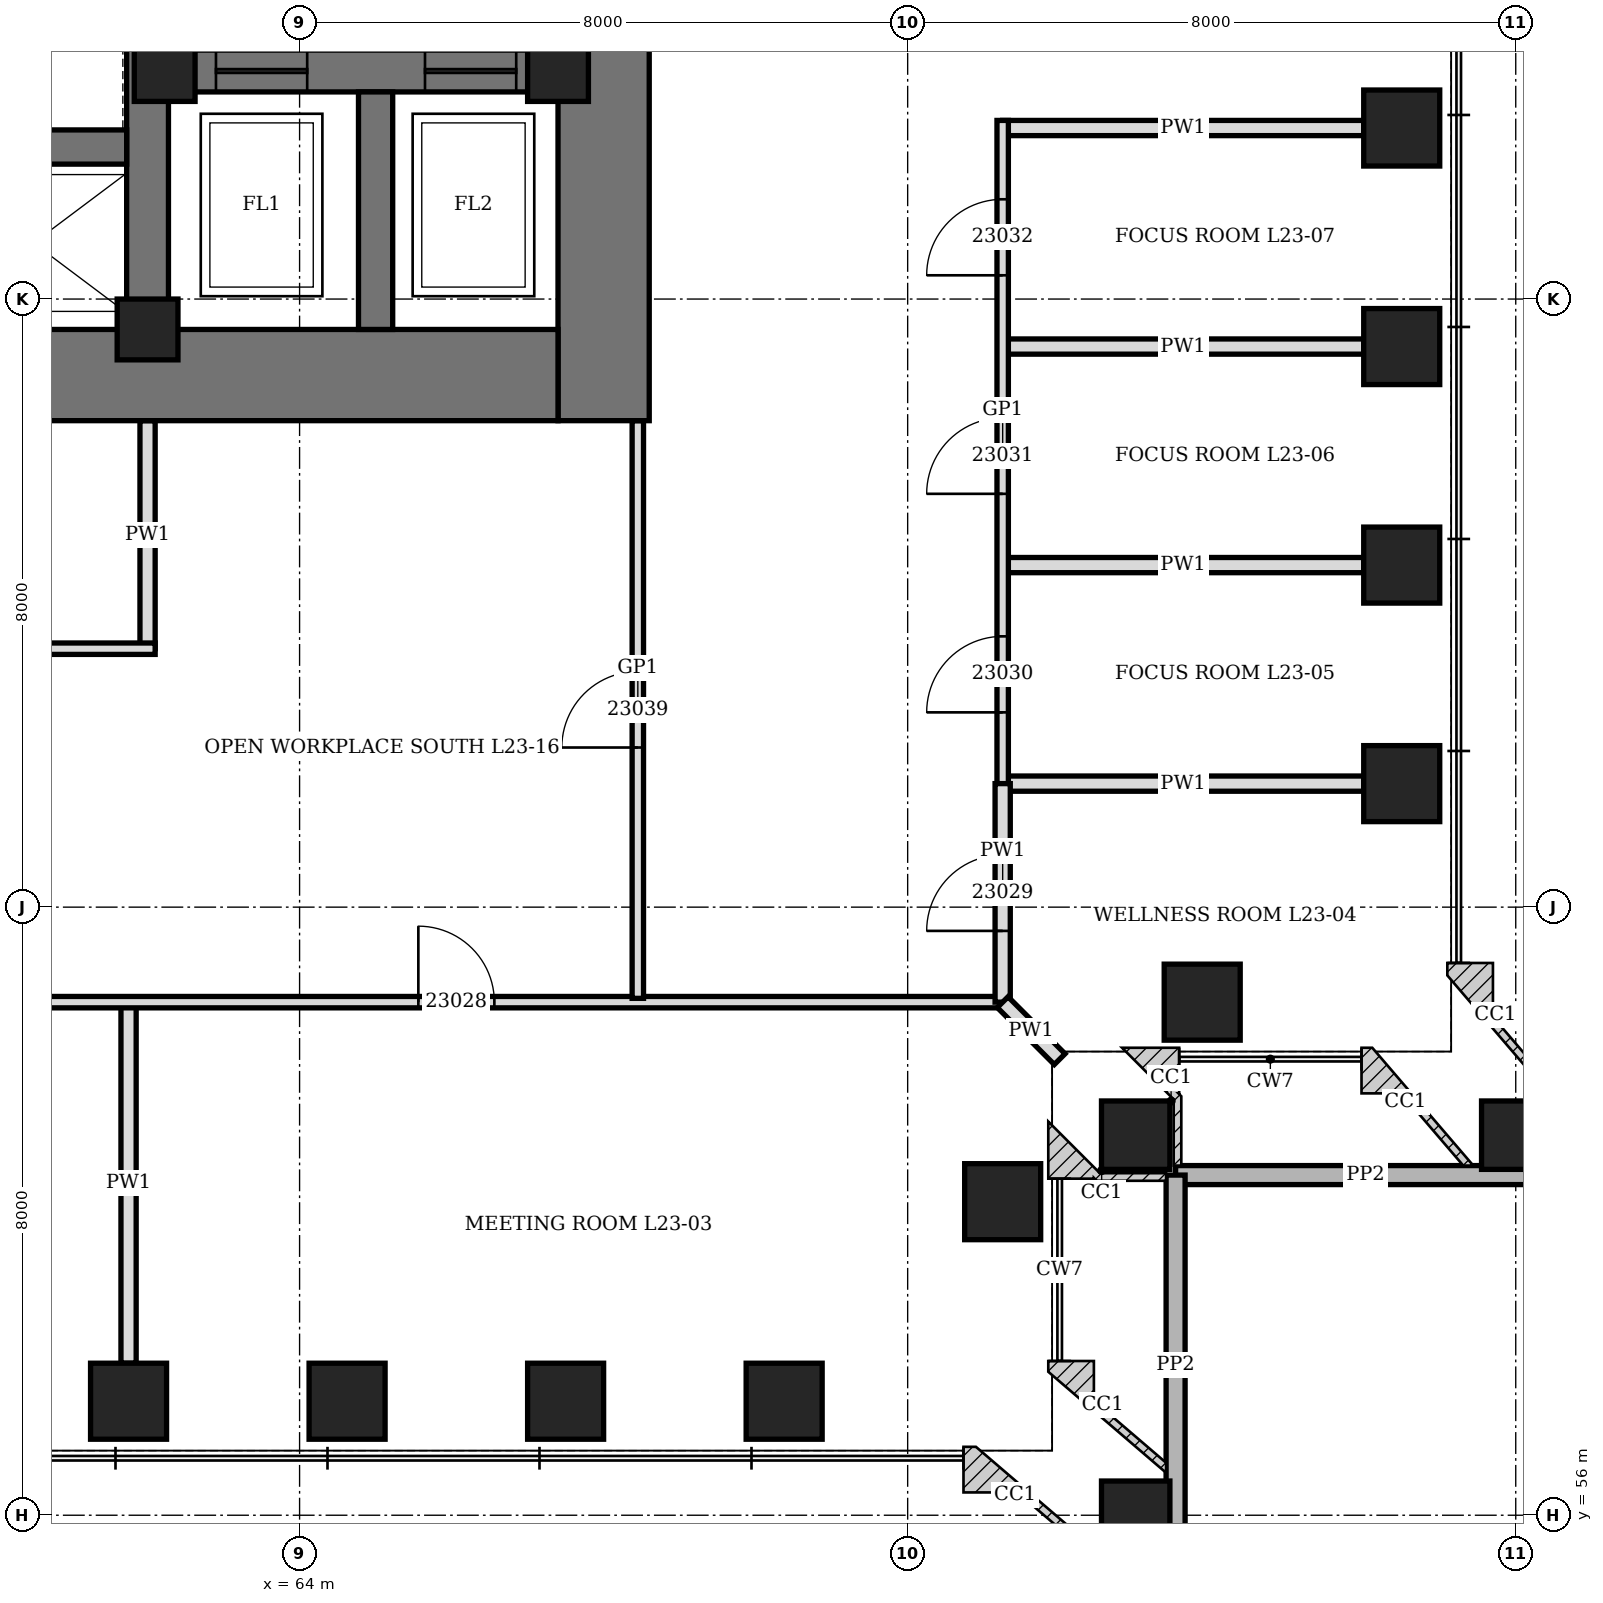
"""IFC4 building model, lengths in metres.
Left out: names, types, materials, properties, quantities, classifications, styles, units other than length and angle.
Written with IfcOpenShell. Run it as: python <this file> out.ifc"""

import sys

from ifc_helpers import new_model, si_unit, direction, frame, frame_2d, origin, origin_2d, place, context, subcontext, project, spatial, rectangle, hollow_rectangle, extrude, clip, halfspace, element, fill, save


model = new_model("IFC4")
c1 = context("Model", 3, precision=1e-05, world=origin(), true_north=direction((0.0, 1.0)))
c2 = subcontext(c1, "Body", "Model", "MODEL_VIEW")
j1 = project(units=[si_unit("LENGTHUNIT", "METRE"), si_unit("PLANEANGLEUNIT", "RADIAN")], contexts=[c1])
p1 = place(None, origin())
s1 = spatial("IfcSite", under=j1, at=p1, CompositionType="ELEMENT")
p2 = place(p1, origin())
s2 = spatial("IfcBuilding", under=s1, at=p2, CompositionType="ELEMENT")
p3 = place(p2, frame((0.0, 0.0, 108.1)))
s3 = spatial("IfcBuildingStorey", under=s2, at=p3, CompositionType="ELEMENT", Elevation=108.1)
for number, where, z_axis, x_axis in (
    (1, (61.75, 57.5, -0.25), (0.0, 0.0, 1.0), (1.0, 0.0, 0.0)),
    (2, (64.625, 57.5, -0.25), (0.0, 0.0, 1.0), (1.0, 0.0, 0.0)),
    (3, (67.5, 57.5, -0.25), (0.0, 0.0, 1.0), (1.0, 0.0, 0.0)),
    (4, (70.375, 57.5, -0.25), (0.0, 0.0, 1.0), (1.0, 0.0, 0.0)),
):
    element("IfcColumn", number, at=place(p3, frame(where, z_axis=z_axis, x_axis=x_axis)), inside=s3, PredefinedType="COLUMN", context=c2, shape_type="SweptSolid", body=[
        extrude(hollow_rectangle(XDim=1.0, YDim=1.0, WallThickness=0.35, at=origin_2d()), origin(), (0.0, 0.0, 1.0), 4.45),
    ])
p4 = place(p3, frame((75.0, 56.0, -0.25), z_axis=(-0.349200787792, 0.299314960964, 0.887957974202), x_axis=(-0.650791373456, -0.759256602365, 0.0)))
e5 = element("IfcColumn", 5, at=p4, inside=s3, PredefinedType="COLUMN", context=c2, shape_type="Clipping", body=[
    clip(clip(extrude(hollow_rectangle(XDim=0.9, YDim=0.9, WallThickness=0.2, at=origin_2d()), origin(), (0.0, 0.0, 1.0), 5.011), halfspace(frame((0.0, 0.0, 0.235), z_axis=(0.0, 0.0, 1.0), x_axis=(1.0, 0.0, 0.0)), True)), halfspace(frame((0.0, 0.0, 4.776), z_axis=(0.0, 0.0, -1.0), x_axis=(1.0, 0.0, 0.0)), True)),
])
p5 = place(p3, frame((73.25, 60.125, -0.25), z_axis=(0.0, 0.0, 1.0), x_axis=(0.0, 1.0, 0.0)))
e6 = element("IfcColumn", 6, at=p5, inside=s3, PredefinedType="COLUMN", context=c2, shape_type="SweptSolid", body=[
    extrude(hollow_rectangle(XDim=1.0, YDim=1.0, WallThickness=0.35, at=origin_2d()), origin(), (0.0, 0.0, 1.0), 4.45),
])
p6 = place(p3, frame((75.0, 61.0, -0.25), z_axis=(-0.343685624304, 0.343685624304, 0.873933855216), x_axis=(-0.707106781187, -0.707106781187, 0.0)))
e7 = element("IfcColumn", 7, at=p6, inside=s3, PredefinedType="COLUMN", context=c2, shape_type="Clipping", body=[
    clip(clip(extrude(hollow_rectangle(XDim=0.9, YDim=0.9, WallThickness=0.2, at=origin_2d()), origin(), (0.0, 0.0, 1.0), 5.092), halfspace(frame((0.0, 0.0, 0.253), z_axis=(0.0, 0.0, 1.0), x_axis=(1.0, 0.0, 0.0)), True)), halfspace(frame((0.0, 0.0, 4.839), z_axis=(0.0, 0.0, -1.0), x_axis=(1.0, 0.0, 0.0)), True)),
])
p7 = place(p3, frame((75.875, 62.75, -0.25), z_axis=(0.0, 0.0, 1.0), x_axis=(1.0, 0.0, 0.0)))
e8 = element("IfcColumn", 8, at=p7, inside=s3, PredefinedType="COLUMN", context=c2, shape_type="SweptSolid", body=[
    extrude(hollow_rectangle(XDim=1.0, YDim=1.0, WallThickness=0.35, at=origin_2d()), origin(), (0.0, 0.0, 1.0), 4.45),
])
p8 = place(p3, frame((80.0, 61.0, -0.25), z_axis=(-0.299314960964, 0.349200787792, 0.887957974202), x_axis=(-0.759256602365, -0.650791373456, 0.0)))
e9 = element("IfcColumn", 9, at=p8, inside=s3, PredefinedType="COLUMN", context=c2, shape_type="Clipping", body=[
    clip(clip(extrude(hollow_rectangle(XDim=0.9, YDim=0.9, WallThickness=0.2, at=origin_2d()), origin(), (0.0, 0.0, 1.0), 5.011), halfspace(frame((0.0, 0.0, 0.235), z_axis=(0.0, 0.0, 1.0), x_axis=(1.0, 0.0, 0.0)), True)), halfspace(frame((0.0, 0.0, 4.776), z_axis=(0.0, 0.0, -1.0), x_axis=(1.0, 0.0, 0.0)), True)),
])
for number, where, z_axis, x_axis in (
    (10, (78.5, 65.625, -0.25), (0.0, 0.0, 1.0), (0.0, 1.0, 0.0)),
    (11, (78.5, 68.5, -0.25), (0.0, 0.0, 1.0), (0.0, 1.0, 0.0)),
    (12, (78.5, 71.375, -0.25), (0.0, 0.0, 1.0), (0.0, 1.0, 0.0)),
    (13, (78.5, 74.25, -0.25), (0.0, 0.0, 1.0), (0.0, 1.0, 0.0)),
):
    element("IfcColumn", number, at=place(p3, frame(where, z_axis=z_axis, x_axis=x_axis)), inside=s3, PredefinedType="COLUMN", context=c2, shape_type="SweptSolid", body=[
        extrude(hollow_rectangle(XDim=1.0, YDim=1.0, WallThickness=0.35, at=origin_2d()), origin(), (0.0, 0.0, 1.0), 4.45),
    ])
p9 = place(p3, frame((68.0, 70.4, 0.0), z_axis=(0.0, 0.0, 1.0), x_axis=(0.0, 1.0, 0.0)))
e14 = element("IfcWall", 14, at=p9, inside=s3, PredefinedType="SHEAR", context=c2, shape_type="SweptSolid", body=[
    extrude(rectangle(XDim=19.2, YDim=1.2, at=frame_2d((9.6, 0.0))), origin(), (0.0, 0.0, 1.0), 4.2),
])
p10 = place(p9, frame((8.6, 0.0, 0.0)))
e15 = element("IfcOpeningElement", 15, at=p10, cuts=e14, PredefinedType="OPENING", context=c2, shape_type="SweptSolid", body=[
    extrude(rectangle(XDim=2.0, YDim=2.4, at=frame_2d((1.0, 1.2))), frame((0.0, 0.61, 0.0), z_axis=(0.0, -1.0, 0.0), x_axis=(1.0, 0.0, 0.0)), (0.0, 0.0, 1.0), 1.22),
])
p11 = place(p3, frame((44.6, 71.0, 0.0), z_axis=(0.0, 0.0, 1.0), x_axis=(1.0, 0.0, 0.0)))
e16 = element("IfcWall", 16, at=p11, inside=s3, PredefinedType="SHEAR", context=c2, shape_type="SweptSolid", body=[
    extrude(rectangle(XDim=22.8, YDim=1.2, at=frame_2d((11.4, 0.0))), origin(), (0.0, 0.0, 1.0), 4.2),
])
p12 = place(p3, frame((62.0, 71.6, 0.0), z_axis=(0.0, 0.0, 1.0), x_axis=(0.0, 1.0, 0.0)))
e17 = element("IfcWall", 17, at=p12, inside=s3, PredefinedType="SHEAR", context=c2, shape_type="SweptSolid", body=[
    extrude(rectangle(XDim=16.8, YDim=0.55, at=frame_2d((8.4, 0.0))), origin(), (0.0, 0.0, 1.0), 4.2),
])
p13 = place(p12, frame((7.5, 0.0, 0.0)))
e18 = element("IfcOpeningElement", 18, at=p13, cuts=e17, PredefinedType="OPENING", context=c2, shape_type="SweptSolid", body=[
    extrude(rectangle(XDim=1.8, YDim=2.4, at=frame_2d((0.9, 1.2))), frame((0.0, 0.285, 0.0), z_axis=(0.0, -1.0, 0.0), x_axis=(1.0, 0.0, 0.0)), (0.0, 0.0, 1.0), 0.57),
])
p14 = place(p3, frame((62.275, 75.0, 0.0), z_axis=(0.0, 0.0, 1.0), x_axis=(1.0, 0.0, 0.0)))
e19 = element("IfcWall", 19, at=p14, inside=s3, PredefinedType="SHEAR", context=c2, shape_type="SweptSolid", body=[
    extrude(rectangle(XDim=5.125, YDim=0.55, at=frame_2d((2.562, 0.0))), origin(), (0.0, 0.0, 1.0), 4.2),
])
p15 = place(p14, frame((0.625, 0.0, 0.0)))
e20 = element("IfcOpeningElement", 20, at=p15, cuts=e19, PredefinedType="OPENING", context=c2, shape_type="SweptSolid", body=[
    extrude(rectangle(XDim=1.2, YDim=2.2, at=frame_2d((0.6, 1.1))), frame((0.0, 0.285, 0.0), z_axis=(0.0, -1.0, 0.0), x_axis=(1.0, 0.0, 0.0)), (0.0, 0.0, 1.0), 0.57),
])
p16 = place(p14, frame((3.375, 0.0, 0.0)))
e21 = element("IfcOpeningElement", 21, at=p16, cuts=e19, PredefinedType="OPENING", context=c2, shape_type="SweptSolid", body=[
    extrude(rectangle(XDim=1.2, YDim=2.2, at=frame_2d((0.6, 1.1))), frame((0.0, 0.285, 0.0), z_axis=(0.0, -1.0, 0.0), x_axis=(1.0, 0.0, 0.0)), (0.0, 0.0, 1.0), 0.57),
])
p17 = place(p3, frame((50.275, 74.0, 0.0), z_axis=(0.0, 0.0, 1.0), x_axis=(1.0, 0.0, 0.0)))
e22 = element("IfcWall", 22, at=p17, inside=s3, PredefinedType="SHEAR", context=c2, shape_type="SweptSolid", body=[
    extrude(rectangle(XDim=11.45, YDim=0.45, at=frame_2d((5.725, 0.0))), origin(), (0.0, 0.0, 1.0), 4.2),
])
p18 = place(p3, frame((65.0, 71.6, 0.0), z_axis=(0.0, 0.0, 1.0), x_axis=(0.0, 1.0, 0.0)))
e23 = element("IfcWall", 23, at=p18, inside=s3, PredefinedType="SHEAR", context=c2, shape_type="SweptSolid", body=[
    extrude(rectangle(XDim=3.125, YDim=0.45, at=frame_2d((1.562, 0.0))), origin(), (0.0, 0.0, 1.0), 4.2),
])
for number, where, z_axis, x_axis in (
    (24, (62.0, 71.6, 0.0), (0.0, 0.0, 1.0), (1.0, 0.0, 0.0)),
    (25, (62.225, 75.0, 0.0), (0.0, 0.0, 1.0), (1.0, 0.0, 0.0)),
    (26, (67.4, 75.0, 0.0), (0.0, 0.0, 1.0), (1.0, 0.0, 0.0)),
):
    element("IfcColumn", number, at=place(p3, frame(where, z_axis=z_axis, x_axis=x_axis)), inside=s3, PredefinedType="COLUMN", context=c2, shape_type="SweptSolid", body=[
        extrude(hollow_rectangle(XDim=0.8, YDim=0.8, WallThickness=0.1, at=origin_2d()), origin(), (0.0, 0.0, 1.0), 4.2),
    ])
for number, where, z_axis, x_axis in (
    (27, (80.525, 60.475, 0.0), (0.0, 0.0, 1.0), (-1.0, 0.0, 0.0)),
    (28, (75.525, 60.475, 0.0), (0.0, 0.0, 1.0), (0.0, -1.0, 0.0)),
):
    element("IfcWall", number, at=place(p3, frame(where, z_axis=z_axis, x_axis=x_axis)), inside=s3, PredefinedType="PARAPET", context=c2, shape_type="SweptSolid", body=[
        extrude(rectangle(XDim=5.0, YDim=0.25, at=frame_2d((2.5, 0.0))), origin(), (0.0, 0.0, 1.0), 1.1),
    ])
p19 = place(p3, frame((61.75, 58.0, 0.0), z_axis=(0.0, 0.0, 1.0), x_axis=(0.0, 1.0, 0.0)))
e29 = element("IfcWall", 29, at=p19, inside=s3, PredefinedType="PARTITIONING", context=c2, shape_type="SweptSolid", body=[
    extrude(rectangle(XDim=4.75, YDim=0.2, at=frame_2d((2.375, 0.0))), origin(), (0.0, 0.0, 1.0), 3.278),
])
for number, where, z_axis, x_axis in (
    (30, (73.25, 65.625, 0.0), (0.0, 0.0, 1.0), (1.0, 0.0, 0.0)),
    (31, (73.25, 68.5, 0.0), (0.0, 0.0, 1.0), (1.0, 0.0, 0.0)),
    (32, (73.25, 71.375, 0.0), (0.0, 0.0, 1.0), (1.0, 0.0, 0.0)),
    (33, (73.25, 74.25, 0.0), (0.0, 0.0, 1.0), (1.0, 0.0, 0.0)),
):
    element("IfcWall", number, at=place(p3, frame(where, z_axis=z_axis, x_axis=x_axis)), inside=s3, PredefinedType="PARTITIONING", context=c2, shape_type="SweptSolid", body=[
        extrude(rectangle(XDim=4.75, YDim=0.2, at=frame_2d((2.375, 0.0))), origin(), (0.0, 0.0, 1.0), 3.428),
    ])
p20 = place(p3, frame((62.0, 67.4, 0.0), z_axis=(0.0, 0.0, 1.0), x_axis=(0.0, 1.0, 0.0)))
e34 = element("IfcWall", 34, at=p20, inside=s3, PredefinedType="PARTITIONING", context=c2, shape_type="SweptSolid", body=[
    extrude(rectangle(XDim=3.0, YDim=0.2, at=frame_2d((1.5, 0.0))), origin(), (0.0, 0.0, 1.0), 4.04),
])
p21 = place(p3, frame((38.75, 62.75, 0.0), z_axis=(0.0, 0.0, 1.0), x_axis=(1.0, 0.0, 0.0)))
e35 = element("IfcWall", 35, at=p21, inside=s3, PredefinedType="PARTITIONING", context=c2, shape_type="SweptSolid", body=[
    extrude(rectangle(XDim=34.5, YDim=0.15, at=frame_2d((17.25, 0.0))), origin(), (0.0, 0.0, 1.0), 4.04),
])
p22 = place(p21, frame((3.5, 0.0, 0.0)))
e36 = element("IfcOpeningElement", 36, at=p22, cuts=e35, PredefinedType="OPENING", context=c2, shape_type="SweptSolid", body=[
    extrude(rectangle(XDim=1.0, YDim=2.4, at=frame_2d((0.5, 1.2))), frame((0.0, 0.085, 0.0), z_axis=(0.0, -1.0, 0.0), x_axis=(1.0, 0.0, 0.0)), (0.0, 0.0, 1.0), 0.17),
])
p23 = place(p21, frame((15.312, 0.0, 0.0)))
e37 = element("IfcOpeningElement", 37, at=p23, cuts=e35, PredefinedType="OPENING", context=c2, shape_type="SweptSolid", body=[
    extrude(rectangle(XDim=1.0, YDim=2.4, at=frame_2d((0.5, 1.2))), frame((0.0, 0.085, 0.0), z_axis=(0.0, -1.0, 0.0), x_axis=(1.0, 0.0, 0.0)), (0.0, 0.0, 1.0), 0.17),
])
p24 = place(p21, frame((26.812, 0.0, 0.0)))
e38 = element("IfcOpeningElement", 38, at=p24, cuts=e35, PredefinedType="OPENING", context=c2, shape_type="SweptSolid", body=[
    extrude(rectangle(XDim=1.0, YDim=2.4, at=frame_2d((0.5, 1.2))), frame((0.0, 0.085, 0.0), z_axis=(0.0, -1.0, 0.0), x_axis=(1.0, 0.0, 0.0)), (0.0, 0.0, 1.0), 0.17),
])
p25 = place(p3, frame((49.9, 67.4, 0.0), z_axis=(0.0, 0.0, 1.0), x_axis=(1.0, 0.0, 0.0)))
e39 = element("IfcWall", 39, at=p25, inside=s3, PredefinedType="PARTITIONING", context=c2, shape_type="SweptSolid", body=[
    extrude(rectangle(XDim=12.2, YDim=0.15, at=frame_2d((6.1, 0.0))), origin(), (0.0, 0.0, 1.0), 4.04),
])
p26 = place(p25, frame((5.6, 0.0, 0.0)))
e40 = element("IfcOpeningElement", 40, at=p26, cuts=e39, PredefinedType="OPENING", context=c2, shape_type="SweptSolid", body=[
    extrude(rectangle(XDim=1.0, YDim=2.4, at=frame_2d((0.5, 1.2))), frame((0.0, 0.085, 0.0), z_axis=(0.0, -1.0, 0.0), x_axis=(1.0, 0.0, 0.0)), (0.0, 0.0, 1.0), 0.17),
])
p27 = place(p3, frame((68.45, 62.8, 0.0), z_axis=(0.0, 0.0, 1.0), x_axis=(0.0, 1.0, 0.0)))
e41 = element("IfcWall", 41, at=p27, inside=s3, PredefinedType="PARTITIONING", context=c2, shape_type="SweptSolid", body=[
    extrude(rectangle(XDim=7.6, YDim=0.15, at=frame_2d((3.8, 0.0))), origin(), (0.0, 0.0, 1.0), 4.04),
])
p28 = place(p27, frame((3.3, 0.0, 0.0)))
e42 = element("IfcOpeningElement", 42, at=p28, cuts=e41, PredefinedType="OPENING", context=c2, shape_type="SweptSolid", body=[
    extrude(rectangle(XDim=1.0, YDim=2.4, at=frame_2d((0.5, 1.2))), frame((0.0, 0.085, 0.0), z_axis=(0.0, -1.0, 0.0), x_axis=(1.0, 0.0, 0.0)), (0.0, 0.0, 1.0), 0.17),
])
p29 = place(p3, frame((73.25, 65.625, 0.0), z_axis=(0.0, 0.0, 1.0), x_axis=(0.0, 1.0, 0.0)))
e43 = element("IfcWall", 43, at=p29, inside=s3, PredefinedType="PARTITIONING", context=c2, shape_type="SweptSolid", body=[
    extrude(rectangle(XDim=8.725, YDim=0.15, at=frame_2d((4.363, 0.0))), origin(), (0.0, 0.0, 1.0), 4.04),
])
p30 = place(p29, frame((0.938, 0.0, 0.0)))
e44 = element("IfcOpeningElement", 44, at=p30, cuts=e43, PredefinedType="OPENING", context=c2, shape_type="SweptSolid", body=[
    extrude(rectangle(XDim=1.0, YDim=2.4, at=frame_2d((0.5, 1.2))), frame((0.0, 0.085, 0.0), z_axis=(0.0, -1.0, 0.0), x_axis=(1.0, 0.0, 0.0)), (0.0, 0.0, 1.0), 0.17),
])
p31 = place(p29, frame((3.812, 0.0, 0.0)))
e45 = element("IfcOpeningElement", 45, at=p31, cuts=e43, PredefinedType="OPENING", context=c2, shape_type="SweptSolid", body=[
    extrude(rectangle(XDim=1.0, YDim=2.4, at=frame_2d((0.5, 1.2))), frame((0.0, 0.085, 0.0), z_axis=(0.0, -1.0, 0.0), x_axis=(1.0, 0.0, 0.0)), (0.0, 0.0, 1.0), 0.17),
])
p32 = place(p29, frame((6.688, 0.0, 0.0)))
e46 = element("IfcOpeningElement", 46, at=p32, cuts=e43, PredefinedType="OPENING", context=c2, shape_type="SweptSolid", body=[
    extrude(rectangle(XDim=1.0, YDim=2.4, at=frame_2d((0.5, 1.2))), frame((0.0, 0.085, 0.0), z_axis=(0.0, -1.0, 0.0), x_axis=(1.0, 0.0, 0.0)), (0.0, 0.0, 1.0), 0.17),
])
p33 = place(p3, frame((73.25, 62.75, 0.0), z_axis=(0.0, 0.0, 1.0), x_axis=(0.0, 1.0, 0.0)))
e47 = element("IfcWall", 47, at=p33, inside=s3, PredefinedType="PARTITIONING", context=c2, shape_type="SweptSolid", body=[
    extrude(rectangle(XDim=2.875, YDim=0.2, at=frame_2d((1.438, 0.0))), origin(), (0.0, 0.0, 1.0), 4.04),
])
p34 = place(p33, frame((0.938, 0.0, 0.0)))
e48 = element("IfcOpeningElement", 48, at=p34, cuts=e47, PredefinedType="OPENING", context=c2, shape_type="SweptSolid", body=[
    extrude(rectangle(XDim=1.0, YDim=2.1, at=frame_2d((0.5, 1.05))), frame((0.0, 0.11, 0.0), z_axis=(0.0, -1.0, 0.0), x_axis=(1.0, 0.0, 0.0)), (0.0, 0.0, 1.0), 0.22),
])
p35 = place(p3, frame((73.25, 62.75, 0.0), z_axis=(0.0, 0.0, 1.0), x_axis=(0.707106781187, -0.707106781187, 0.0)))
e49 = element("IfcWall", 49, at=p35, inside=s3, PredefinedType="PARTITIONING", context=c2, shape_type="SweptSolid", body=[
    extrude(rectangle(XDim=1.061, YDim=0.2, at=frame_2d((0.53, 0.0))), origin(), (0.0, 0.0, 1.0), 4.04),
])
p36 = place(p15, origin())
e50 = element("IfcDoor", 50, at=p36, inside=s3, OperationType="SLIDING_TO_LEFT", PredefinedType="DOOR", context=c2, shape_type="SweptSolid", body=[
    extrude(rectangle(XDim=1.2, YDim=2.2, at=frame_2d((0.6, 1.1))), frame((0.0, 0.275, 0.0), z_axis=(0.0, -1.0, 0.0), x_axis=(1.0, 0.0, 0.0)), (0.0, 0.0, 1.0), 0.55),
])
fill(e20, e50)
p37 = place(p16, origin())
e51 = element("IfcDoor", 51, at=p37, inside=s3, OperationType="SLIDING_TO_LEFT", PredefinedType="DOOR", context=c2, shape_type="SweptSolid", body=[
    extrude(rectangle(XDim=1.2, YDim=2.2, at=frame_2d((0.6, 1.1))), frame((0.0, 0.275, 0.0), z_axis=(0.0, -1.0, 0.0), x_axis=(1.0, 0.0, 0.0)), (0.0, 0.0, 1.0), 0.55),
])
fill(e21, e51)
p38 = place(p24, origin())
e52 = element("IfcDoor", 52, at=p38, inside=s3, OperationType="SINGLE_SWING_RIGHT", PredefinedType="DOOR", context=c2, shape_type="SweptSolid", body=[
    extrude(rectangle(XDim=1.0, YDim=2.4, at=frame_2d((0.5, 1.2))), frame((0.0, 0.075, 0.0), z_axis=(0.0, -1.0, 0.0), x_axis=(1.0, 0.0, 0.0)), (0.0, 0.0, 1.0), 0.149),
])
fill(e38, e52)
p39 = place(p34, origin())
e53 = element("IfcDoor", 53, at=p39, inside=s3, OperationType="SINGLE_SWING_LEFT", PredefinedType="DOOR", context=c2, shape_type="SweptSolid", body=[
    extrude(rectangle(XDim=1.0, YDim=2.1, at=frame_2d((0.5, 1.05))), frame((0.0, 0.1, 0.0), z_axis=(0.0, -1.0, 0.0), x_axis=(1.0, 0.0, 0.0)), (0.0, 0.0, 1.0), 0.199),
])
fill(e48, e53)
p40 = place(p30, origin())
e54 = element("IfcDoor", 54, at=p40, inside=s3, OperationType="SINGLE_SWING_RIGHT", PredefinedType="DOOR", context=c2, shape_type="SweptSolid", body=[
    extrude(rectangle(XDim=1.0, YDim=2.4, at=frame_2d((0.5, 1.2))), frame((0.0, 0.075, 0.0), z_axis=(0.0, -1.0, 0.0), x_axis=(1.0, 0.0, 0.0)), (0.0, 0.0, 1.0), 0.149),
])
fill(e44, e54)
p41 = place(p31, origin())
e55 = element("IfcDoor", 55, at=p41, inside=s3, OperationType="SINGLE_SWING_RIGHT", PredefinedType="DOOR", context=c2, shape_type="SweptSolid", body=[
    extrude(rectangle(XDim=1.0, YDim=2.4, at=frame_2d((0.5, 1.2))), frame((0.0, 0.075, 0.0), z_axis=(0.0, -1.0, 0.0), x_axis=(1.0, 0.0, 0.0)), (0.0, 0.0, 1.0), 0.149),
])
fill(e45, e55)
p42 = place(p32, origin())
e56 = element("IfcDoor", 56, at=p42, inside=s3, OperationType="SINGLE_SWING_RIGHT", PredefinedType="DOOR", context=c2, shape_type="SweptSolid", body=[
    extrude(rectangle(XDim=1.0, YDim=2.4, at=frame_2d((0.5, 1.2))), frame((0.0, 0.075, 0.0), z_axis=(0.0, -1.0, 0.0), x_axis=(1.0, 0.0, 0.0)), (0.0, 0.0, 1.0), 0.149),
])
fill(e46, e56)
p43 = place(p28, origin())
e57 = element("IfcDoor", 57, at=p43, inside=s3, OperationType="SINGLE_SWING_RIGHT", PredefinedType="DOOR", context=c2, shape_type="SweptSolid", body=[
    extrude(rectangle(XDim=1.0, YDim=2.4, at=frame_2d((0.5, 1.2))), frame((0.0, 0.075, 0.0), z_axis=(0.0, -1.0, 0.0), x_axis=(1.0, 0.0, 0.0)), (0.0, 0.0, 1.0), 0.149),
])
fill(e42, e57)
save(model, sys.argv[1])
